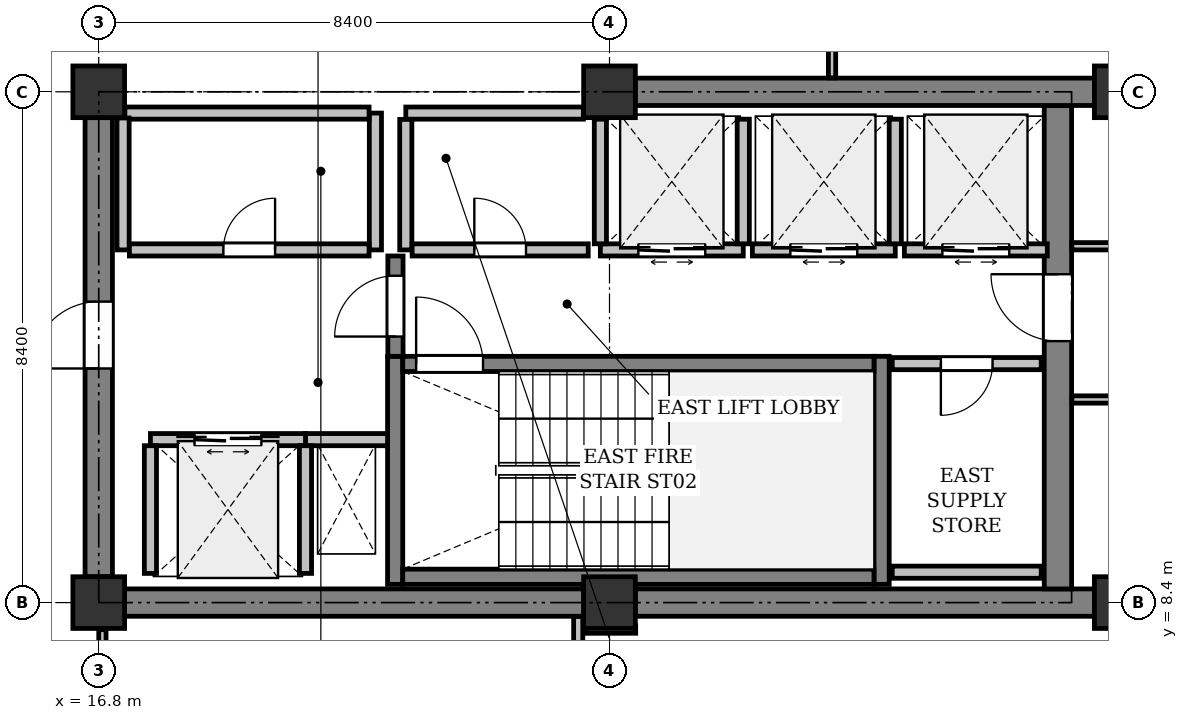
"""IFC4 building model, lengths in metres.
Left out: names, types, materials, properties, quantities, classifications, styles, units other than length and angle.
Written with IfcOpenShell. Run it as: python <this file> out.ifc"""

import sys

from ifc_helpers import new_model, si_unit, direction, frame, frame_2d, origin, origin_2d, place, context, subcontext, project, spatial, rectangle, extrude, element, fill, save


model = new_model("IFC4")
c1 = context("Model", 3, precision=1e-05, world=origin(), true_north=direction((0.0, 1.0)))
c2 = subcontext(c1, "Body", "Model", "MODEL_VIEW")
j1 = project(units=[si_unit("LENGTHUNIT", "METRE"), si_unit("PLANEANGLEUNIT", "RADIAN")], contexts=[c1])
p1 = place(None, origin())
s1 = spatial("IfcSite", under=j1, at=p1, CompositionType="ELEMENT")
p2 = place(p1, origin())
s2 = spatial("IfcBuilding", under=s1, at=p2, CompositionType="ELEMENT")
p3 = place(p2, frame((0.0, 0.0, 250.2)))
s3 = spatial("IfcBuildingStorey", under=s2, at=p3, CompositionType="ELEMENT", Elevation=250.2)
for number, where, z_axis, x_axis in (
    (1, (16.8, 8.4, 0.0), (0.0, 0.0, 1.0), (1.0, 0.0, 0.0)),
    (2, (16.8, 16.8, 0.0), (0.0, 0.0, 1.0), (1.0, 0.0, 0.0)),
    (3, (25.2, 8.4, 0.0), (0.0, 0.0, 1.0), (1.0, 0.0, 0.0)),
    (4, (25.2, 16.8, 0.0), (0.0, 0.0, 1.0), (1.0, 0.0, 0.0)),
    (5, (33.6, 8.4, 0.0), (0.0, 0.0, 1.0), (1.0, 0.0, 0.0)),
    (6, (33.6, 16.8, 0.0), (0.0, 0.0, 1.0), (1.0, 0.0, 0.0)),
):
    element("IfcColumn", number, at=place(p3, frame(where, z_axis=z_axis, x_axis=x_axis)), inside=s3, PredefinedType="COLUMN", context=c2, shape_type="SweptSolid", body=[
        extrude(rectangle(XDim=0.85, YDim=0.85, at=origin_2d()), origin(), (0.0, 0.0, 1.0), 4.0),
    ])
p4 = place(p3, frame((17.225, 8.4, 0.0), z_axis=(0.0, 0.0, 1.0), x_axis=(1.0, 0.0, 0.0)))
e7 = element("IfcWall", 7, at=p4, inside=s3, PredefinedType="SHEAR", context=c2, shape_type="SweptSolid", body=[
    extrude(rectangle(XDim=7.55, YDim=0.45, at=frame_2d((3.775, 0.0))), origin(), (0.0, 0.0, 1.0), 3.725),
])
p5 = place(p3, frame((25.625, 8.4, 0.0), z_axis=(0.0, 0.0, 1.0), x_axis=(1.0, 0.0, 0.0)))
e8 = element("IfcWall", 8, at=p5, inside=s3, PredefinedType="SHEAR", context=c2, shape_type="SweptSolid", body=[
    extrude(rectangle(XDim=7.55, YDim=0.45, at=frame_2d((3.775, 0.0))), origin(), (0.0, 0.0, 1.0), 3.725),
])
p6 = place(p3, frame((32.575, 8.625, 0.0), z_axis=(0.0, 0.0, 1.0), x_axis=(0.0, 1.0, 0.0)))
e9 = element("IfcWall", 9, at=p6, inside=s3, PredefinedType="SHEAR", context=c2, shape_type="SweptSolid", body=[
    extrude(rectangle(XDim=7.95, YDim=0.45, at=frame_2d((3.975, 0.0))), origin(), (0.0, 0.0, 1.0), 3.725),
])
p7 = place(p6, frame((4.075, 0.0, 0.0)))
e10 = element("IfcOpeningElement", 10, at=p7, cuts=e9, PredefinedType="OPENING", context=c2, shape_type="SweptSolid", body=[
    extrude(rectangle(XDim=1.1, YDim=2.15, at=frame_2d((0.55, 1.075))), frame((0.0, 0.235, 0.0), z_axis=(0.0, -1.0, 0.0), x_axis=(1.0, 0.0, 0.0)), (0.0, 0.0, 1.0), 0.47),
])
p8 = place(p3, frame((16.8, 8.825, 0.0), z_axis=(0.0, 0.0, 1.0), x_axis=(0.0, 1.0, 0.0)))
e11 = element("IfcWall", 11, at=p8, inside=s3, PredefinedType="SHEAR", context=c2, shape_type="SweptSolid", body=[
    extrude(rectangle(XDim=7.55, YDim=0.45, at=frame_2d((3.775, 0.0))), origin(), (0.0, 0.0, 1.0), 3.725),
])
p9 = place(p8, frame((3.425, 0.0, 0.0)))
e12 = element("IfcOpeningElement", 12, at=p9, cuts=e11, PredefinedType="OPENING", context=c2, shape_type="SweptSolid", body=[
    extrude(rectangle(XDim=1.1, YDim=2.15, at=frame_2d((0.55, 1.075))), frame((0.0, 0.235, 0.0), z_axis=(0.0, -1.0, 0.0), x_axis=(1.0, 0.0, 0.0)), (0.0, 0.0, 1.0), 0.47),
])
p10 = place(p3, frame((25.625, 16.8, 0.0), z_axis=(0.0, 0.0, 1.0), x_axis=(1.0, 0.0, 0.0)))
e13 = element("IfcWall", 13, at=p10, inside=s3, PredefinedType="SHEAR", context=c2, shape_type="SweptSolid", body=[
    extrude(rectangle(XDim=7.55, YDim=0.45, at=frame_2d((3.775, 0.0))), origin(), (0.0, 0.0, 1.0), 3.725),
])
for number, where, z_axis, x_axis in (
    (14, (21.675, 8.7, 0.0), (0.0, 0.0, 1.0), (0.0, 1.0, 0.0)),
    (15, (29.675, 8.7, 0.0), (0.0, 0.0, 1.0), (0.0, 1.0, 0.0)),
):
    element("IfcWall", number, at=place(p3, frame(where, z_axis=z_axis, x_axis=x_axis)), inside=s3, PredefinedType="SHEAR", context=c2, shape_type="SweptSolid", body=[
        extrude(rectangle(XDim=3.75, YDim=0.25, at=frame_2d((1.875, 0.0))), origin(), (0.0, 0.0, 1.0), 3.725),
    ])
p11 = place(p3, frame((21.8, 8.825, 0.0), z_axis=(0.0, 0.0, 1.0), x_axis=(1.0, 0.0, 0.0)))
e16 = element("IfcWall", 16, at=p11, inside=s3, PredefinedType="SHEAR", context=c2, shape_type="SweptSolid", body=[
    extrude(rectangle(XDim=7.75, YDim=0.25, at=frame_2d((3.875, 0.0))), origin(), (0.0, 0.0, 1.0), 3.725),
])
p12 = place(p3, frame((21.8, 12.325, 0.0), z_axis=(0.0, 0.0, 1.0), x_axis=(1.0, 0.0, 0.0)))
e17 = element("IfcWall", 17, at=p12, inside=s3, PredefinedType="SHEAR", context=c2, shape_type="SweptSolid", body=[
    extrude(rectangle(XDim=7.75, YDim=0.25, at=frame_2d((3.875, 0.0))), origin(), (0.0, 0.0, 1.0), 3.725),
])
p13 = place(p12, frame((0.22, 0.0, 0.0)))
e18 = element("IfcOpeningElement", 18, at=p13, cuts=e17, PredefinedType="OPENING", context=c2, shape_type="SweptSolid", body=[
    extrude(rectangle(XDim=1.1, YDim=2.15, at=frame_2d((0.55, 1.075))), frame((0.0, 0.135, 0.0), z_axis=(0.0, -1.0, 0.0), x_axis=(1.0, 0.0, 0.0)), (0.0, 0.0, 1.0), 0.27),
])
p14 = place(p3, frame((20.2, 11.08, 0.0), z_axis=(0.0, 0.0, 1.0), x_axis=(1.0, 0.0, 0.0)))
e19 = element("IfcWall", 19, at=p14, inside=s3, PredefinedType="PARTITIONING", context=c2, shape_type="SweptSolid", body=[
    extrude(rectangle(XDim=1.35, YDim=0.2, at=frame_2d((0.675, 0.0))), origin(), (0.0, 0.0, 1.0), 3.725),
])
p15 = place(p3, frame((21.68, 12.45, 0.0), z_axis=(0.0, 0.0, 1.0), x_axis=(0.0, 1.0, 0.0)))
e20 = element("IfcWall", 20, at=p15, inside=s3, PredefinedType="SHEAR", context=c2, shape_type="SweptSolid", body=[
    extrude(rectangle(XDim=1.65, YDim=0.25, at=frame_2d((0.825, 0.0))), origin(), (0.0, 0.0, 1.0), 3.725),
])
p16 = place(p15, frame((0.325, 0.0, 0.0)))
e21 = element("IfcOpeningElement", 21, at=p16, cuts=e20, PredefinedType="OPENING", context=c2, shape_type="SweptSolid", body=[
    extrude(rectangle(XDim=1.0, YDim=2.15, at=frame_2d((0.5, 1.075))), frame((0.0, 0.135, 0.0), z_axis=(0.0, -1.0, 0.0), x_axis=(1.0, 0.0, 0.0)), (0.0, 0.0, 1.0), 0.27),
])
p17 = place(p3, frame((17.65, 11.08, 0.0), z_axis=(0.0, 0.0, 1.0), x_axis=(1.0, 0.0, 0.0)))
e22 = element("IfcWall", 22, at=p17, inside=s3, PredefinedType="PARTITIONING", context=c2, shape_type="SweptSolid", body=[
    extrude(rectangle(XDim=2.55, YDim=0.2, at=frame_2d((1.275, 0.0))), origin(), (0.0, 0.0, 1.0), 3.725),
])
p18 = place(p17, frame((0.725, 0.0, 0.0)))
e23 = element("IfcOpeningElement", 23, at=p18, cuts=e22, PredefinedType="OPENING", context=c2, shape_type="SweptSolid", body=[
    extrude(rectangle(XDim=1.1, YDim=2.2, at=frame_2d((0.55, 1.1))), frame((0.0, 0.11, 0.0), z_axis=(0.0, -1.0, 0.0), x_axis=(1.0, 0.0, 0.0)), (0.0, 0.0, 1.0), 0.22),
])
for number, where, z_axis, x_axis in (
    (24, (20.2, 8.88, 0.0), (0.0, 0.0, 1.0), (0.0, 1.0, 0.0)),
    (25, (17.65, 8.88, 0.0), (0.0, 0.0, 1.0), (0.0, 1.0, 0.0)),
):
    element("IfcWall", number, at=place(p3, frame(where, z_axis=z_axis, x_axis=x_axis)), inside=s3, PredefinedType="PARTITIONING", context=c2, shape_type="SweptSolid", body=[
        extrude(rectangle(XDim=2.1, YDim=0.2, at=frame_2d((1.05, 0.0))), origin(), (0.0, 0.0, 1.0), 3.725),
    ])
p19 = place(p3, frame((25.05, 14.2, 0.0), z_axis=(0.0, 0.0, 1.0), x_axis=(1.0, 0.0, 0.0)))
e26 = element("IfcWall", 26, at=p19, inside=s3, PredefinedType="PARTITIONING", context=c2, shape_type="SweptSolid", body=[
    extrude(rectangle(XDim=2.35, YDim=0.2, at=frame_2d((1.175, 0.0))), origin(), (0.0, 0.0, 1.0), 3.725),
])
p20 = place(p19, frame((0.625, 0.0, 0.0)))
e27 = element("IfcOpeningElement", 27, at=p20, cuts=e26, PredefinedType="OPENING", context=c2, shape_type="SweptSolid", body=[
    extrude(rectangle(XDim=1.1, YDim=2.2, at=frame_2d((0.55, 1.1))), frame((0.0, 0.11, 0.0), z_axis=(0.0, -1.0, 0.0), x_axis=(1.0, 0.0, 0.0)), (0.0, 0.0, 1.0), 0.22),
])
for number, where, z_axis, x_axis in (
    (28, (27.4, 14.3, 0.0), (0.0, 0.0, 1.0), (0.0, 1.0, 0.0)),
    (29, (25.05, 14.3, 0.0), (0.0, 0.0, 1.0), (0.0, 1.0, 0.0)),
):
    element("IfcWall", number, at=place(p3, frame(where, z_axis=z_axis, x_axis=x_axis)), inside=s3, PredefinedType="PARTITIONING", context=c2, shape_type="SweptSolid", body=[
        extrude(rectangle(XDim=2.05, YDim=0.2, at=frame_2d((1.025, 0.0))), origin(), (0.0, 0.0, 1.0), 3.725),
    ])
p21 = place(p3, frame((27.55, 14.2, 0.0), z_axis=(0.0, 0.0, 1.0), x_axis=(1.0, 0.0, 0.0)))
e30 = element("IfcWall", 30, at=p21, inside=s3, PredefinedType="PARTITIONING", context=c2, shape_type="SweptSolid", body=[
    extrude(rectangle(XDim=2.35, YDim=0.2, at=frame_2d((1.175, 0.0))), origin(), (0.0, 0.0, 1.0), 3.725),
])
p22 = place(p21, frame((0.625, 0.0, 0.0)))
e31 = element("IfcOpeningElement", 31, at=p22, cuts=e30, PredefinedType="OPENING", context=c2, shape_type="SweptSolid", body=[
    extrude(rectangle(XDim=1.1, YDim=2.2, at=frame_2d((0.55, 1.1))), frame((0.0, 0.11, 0.0), z_axis=(0.0, -1.0, 0.0), x_axis=(1.0, 0.0, 0.0)), (0.0, 0.0, 1.0), 0.22),
])
p23 = place(p3, frame((29.9, 14.3, 0.0), z_axis=(0.0, 0.0, 1.0), x_axis=(0.0, 1.0, 0.0)))
e32 = element("IfcWall", 32, at=p23, inside=s3, PredefinedType="PARTITIONING", context=c2, shape_type="SweptSolid", body=[
    extrude(rectangle(XDim=2.05, YDim=0.2, at=frame_2d((1.025, 0.0))), origin(), (0.0, 0.0, 1.0), 3.725),
])
p24 = place(p3, frame((30.05, 14.2, 0.0), z_axis=(0.0, 0.0, 1.0), x_axis=(1.0, 0.0, 0.0)))
e33 = element("IfcWall", 33, at=p24, inside=s3, PredefinedType="PARTITIONING", context=c2, shape_type="SweptSolid", body=[
    extrude(rectangle(XDim=2.35, YDim=0.2, at=frame_2d((1.175, 0.0))), origin(), (0.0, 0.0, 1.0), 3.725),
])
p25 = place(p24, frame((0.625, 0.0, 0.0)))
e34 = element("IfcOpeningElement", 34, at=p25, cuts=e33, PredefinedType="OPENING", context=c2, shape_type="SweptSolid", body=[
    extrude(rectangle(XDim=1.1, YDim=2.2, at=frame_2d((0.55, 1.1))), frame((0.0, 0.11, 0.0), z_axis=(0.0, -1.0, 0.0), x_axis=(1.0, 0.0, 0.0)), (0.0, 0.0, 1.0), 0.22),
])
p26 = place(p3, frame((21.35, 14.2, 0.0), z_axis=(0.0, 0.0, 1.0), x_axis=(0.0, 1.0, 0.0)))
e35 = element("IfcWall", 35, at=p26, inside=s3, PredefinedType="PARTITIONING", context=c2, shape_type="SweptSolid", body=[
    extrude(rectangle(XDim=2.25, YDim=0.2, at=frame_2d((1.125, 0.0))), origin(), (0.0, 0.0, 1.0), 3.725),
])
p27 = place(p3, frame((21.246, 16.45, 0.0), z_axis=(0.0, 0.0, 1.0), x_axis=(-1.0, 0.0, 0.0)))
e36 = element("IfcWall", 36, at=p27, inside=s3, PredefinedType="PARTITIONING", context=c2, shape_type="SweptSolid", body=[
    extrude(rectangle(XDim=4.016, YDim=0.2, at=frame_2d((2.008, 0.0))), origin(), (0.0, 0.0, 1.0), 3.725),
])
p28 = place(p3, frame((17.2, 16.37, 0.0), z_axis=(0.0, 0.0, 1.0), x_axis=(0.0, -1.0, 0.0)))
e37 = element("IfcWall", 37, at=p28, inside=s3, PredefinedType="PARTITIONING", context=c2, shape_type="SweptSolid", body=[
    extrude(rectangle(XDim=2.17, YDim=0.2, at=frame_2d((1.085, 0.0))), origin(), (0.0, 0.0, 1.0), 3.725),
])
p29 = place(p3, frame((17.304, 14.2, 0.0), z_axis=(0.0, 0.0, 1.0), x_axis=(1.0, 0.0, 0.0)))
e38 = element("IfcWall", 38, at=p29, inside=s3, PredefinedType="PARTITIONING", context=c2, shape_type="SweptSolid", body=[
    extrude(rectangle(XDim=3.942, YDim=0.2, at=frame_2d((1.971, 0.0))), origin(), (0.0, 0.0, 1.0), 3.725),
])
p30 = place(p29, frame((1.546, 0.0, 0.0)))
e39 = element("IfcOpeningElement", 39, at=p30, cuts=e38, PredefinedType="OPENING", context=c2, shape_type="SweptSolid", body=[
    extrude(rectangle(XDim=0.85, YDim=2.15, at=frame_2d((0.425, 1.075))), frame((0.0, 0.11, 0.0), z_axis=(0.0, -1.0, 0.0), x_axis=(1.0, 0.0, 0.0)), (0.0, 0.0, 1.0), 0.22),
])
p31 = place(p3, frame((24.77, 16.45, 0.0), z_axis=(0.0, 0.0, 1.0), x_axis=(-1.0, 0.0, 0.0)))
e40 = element("IfcWall", 40, at=p31, inside=s3, PredefinedType="PARTITIONING", context=c2, shape_type="SweptSolid", body=[
    extrude(rectangle(XDim=2.92, YDim=0.2, at=frame_2d((1.46, 0.0))), origin(), (0.0, 0.0, 1.0), 3.725),
])
p32 = place(p3, frame((21.85, 16.346, 0.0), z_axis=(0.0, 0.0, 1.0), x_axis=(0.0, -1.0, 0.0)))
e41 = element("IfcWall", 41, at=p32, inside=s3, PredefinedType="PARTITIONING", context=c2, shape_type="SweptSolid", body=[
    extrude(rectangle(XDim=2.146, YDim=0.2, at=frame_2d((1.073, 0.0))), origin(), (0.0, 0.0, 1.0), 3.725),
])
p33 = place(p3, frame((21.954, 14.2, 0.0), z_axis=(0.0, 0.0, 1.0), x_axis=(1.0, 0.0, 0.0)))
e42 = element("IfcWall", 42, at=p33, inside=s3, PredefinedType="PARTITIONING", context=c2, shape_type="SweptSolid", body=[
    extrude(rectangle(XDim=2.896, YDim=0.2, at=frame_2d((1.448, 0.0))), origin(), (0.0, 0.0, 1.0), 3.725),
])
p34 = place(p33, frame((1.023, 0.0, 0.0)))
e43 = element("IfcOpeningElement", 43, at=p34, cuts=e42, PredefinedType="OPENING", context=c2, shape_type="SweptSolid", body=[
    extrude(rectangle(XDim=0.85, YDim=2.15, at=frame_2d((0.425, 1.075))), frame((0.0, 0.11, 0.0), z_axis=(0.0, -1.0, 0.0), x_axis=(1.0, 0.0, 0.0)), (0.0, 0.0, 1.0), 0.22),
])
p35 = place(p3, frame((32.3, 12.33, 0.0), z_axis=(0.0, 0.0, 1.0), x_axis=(-1.0, 0.0, 0.0)))
e44 = element("IfcWall", 44, at=p35, inside=s3, PredefinedType="PARTITIONING", context=c2, shape_type="SweptSolid", body=[
    extrude(rectangle(XDim=2.45, YDim=0.2, at=frame_2d((1.225, 0.0))), origin(), (0.0, 0.0, 1.0), 3.725),
])
p36 = place(p35, frame((0.8, 0.0, 0.0)))
e45 = element("IfcOpeningElement", 45, at=p36, cuts=e44, PredefinedType="OPENING", context=c2, shape_type="SweptSolid", body=[
    extrude(rectangle(XDim=0.85, YDim=2.15, at=frame_2d((0.425, 1.075))), frame((0.0, 0.11, 0.0), z_axis=(0.0, -1.0, 0.0), x_axis=(1.0, 0.0, 0.0)), (0.0, 0.0, 1.0), 0.22),
])
p37 = place(p3, frame((29.85, 8.9, 0.0), z_axis=(0.0, 0.0, 1.0), x_axis=(1.0, 0.0, 0.0)))
e46 = element("IfcWall", 46, at=p37, inside=s3, PredefinedType="PARTITIONING", context=c2, shape_type="SweptSolid", body=[
    extrude(rectangle(XDim=2.45, YDim=0.2, at=frame_2d((1.225, 0.0))), origin(), (0.0, 0.0, 1.0), 3.725),
])
p38 = place(p3, frame((28.86, 19.05, 0.0), z_axis=(0.0, 0.0, 1.0), x_axis=(0.0, -1.0, 0.0)))
e47 = element("IfcWall", 47, at=p38, inside=s3, PredefinedType="PARTITIONING", context=c2, shape_type="SweptSolid", body=[
    extrude(rectangle(XDim=2.021, YDim=0.12, at=frame_2d((1.01, 0.0))), origin(), (0.0, 0.0, 1.0), 3.725),
])
p39 = place(p3, frame((32.804, 14.26, 0.0), z_axis=(0.0, 0.0, 1.0), x_axis=(1.0, 0.0, 0.0)))
e48 = element("IfcWall", 48, at=p39, inside=s3, PredefinedType="PARTITIONING", context=c2, shape_type="SweptSolid", body=[
    extrude(rectangle(XDim=1.536, YDim=0.12, at=frame_2d((0.768, 0.0))), origin(), (0.0, 0.0, 1.0), 3.319),
])
p40 = place(p3, frame((24.686, 0.169, 0.0), z_axis=(0.0, 0.0, 1.0), x_axis=(0.0, 1.0, 0.0)))
e49 = element("IfcWall", 49, at=p40, inside=s3, PredefinedType="PARTITIONING", context=c2, shape_type="SweptSolid", body=[
    extrude(rectangle(XDim=8.002, YDim=0.15, at=frame_2d((4.001, 0.0))), origin(), (0.0, 0.0, 1.0), 3.725),
])
p41 = place(p3, frame((16.86, 7.955, 0.0), z_axis=(0.0, 0.0, 1.0), x_axis=(0.0, -1.0, 0.0)))
e50 = element("IfcWall", 50, at=p41, inside=s3, PredefinedType="PARTITIONING", context=c2, shape_type="SweptSolid", body=[
    extrude(rectangle(XDim=2.555, YDim=0.12, at=frame_2d((1.278, 0.0))), origin(), (0.0, 0.0, 1.0), 3.319),
])
p42 = place(p41, frame((0.802, 0.0, 0.0)))
e51 = element("IfcOpeningElement", 51, at=p42, cuts=e50, PredefinedType="OPENING", context=c2, shape_type="SweptSolid", body=[
    extrude(rectangle(XDim=0.95, YDim=2.15, at=frame_2d((0.475, 1.075))), frame((0.0, 0.07, 0.0), z_axis=(0.0, -1.0, 0.0), x_axis=(1.0, 0.0, 0.0)), (0.0, 0.0, 1.0), 0.14),
])
p43 = place(p3, frame((25.631, 7.956, 0.0), z_axis=(0.0, 0.0, 1.0), x_axis=(-0.999999606339, -0.000887311097, 0.0)))
e52 = element("IfcWall", 52, at=p43, inside=s3, PredefinedType="PARTITIONING", context=c2, shape_type="SweptSolid", body=[
    extrude(rectangle(XDim=0.825, YDim=0.12, at=frame_2d((0.413, 0.0))), origin(), (0.0, 0.0, 1.0), 3.319),
])
p44 = place(p3, frame((34.261, 11.74, 0.0), z_axis=(0.0, 0.0, 1.0), x_axis=(-1.0, 0.0, 0.0)))
e53 = element("IfcWall", 53, at=p44, inside=s3, PredefinedType="PARTITIONING", context=c2, shape_type="SweptSolid", body=[
    extrude(rectangle(XDim=1.457, YDim=0.12, at=frame_2d((0.729, 0.0))), origin(), (0.0, 0.0, 1.0), 3.319),
])
p45 = place(p7, origin())
e54 = element("IfcDoor", 54, at=p45, inside=s3, OperationType="SINGLE_SWING_RIGHT", PredefinedType="DOOR", context=c2, shape_type="SweptSolid", body=[
    extrude(rectangle(XDim=1.1, YDim=2.15, at=frame_2d((0.55, 1.075))), frame((0.0, 0.025, 0.0), z_axis=(0.0, -1.0, 0.0), x_axis=(1.0, 0.0, 0.0)), (0.0, 0.0, 1.0), 0.05),
])
fill(e10, e54)
p46 = place(p9, origin())
e55 = element("IfcDoor", 55, at=p46, inside=s3, OperationType="SINGLE_SWING_LEFT", PredefinedType="DOOR", context=c2, shape_type="SweptSolid", body=[
    extrude(rectangle(XDim=1.1, YDim=2.15, at=frame_2d((0.55, 1.075))), frame((0.0, 0.025, 0.0), z_axis=(0.0, -1.0, 0.0), x_axis=(1.0, 0.0, 0.0)), (0.0, 0.0, 1.0), 0.05),
])
fill(e12, e55)
p47 = place(p13, origin())
e56 = element("IfcDoor", 56, at=p47, inside=s3, OperationType="SINGLE_SWING_LEFT", PredefinedType="DOOR", context=c2, shape_type="SweptSolid", body=[
    extrude(rectangle(XDim=1.1, YDim=2.15, at=frame_2d((0.55, 1.075))), frame((0.0, 0.025, 0.0), z_axis=(0.0, -1.0, 0.0), x_axis=(1.0, 0.0, 0.0)), (0.0, 0.0, 1.0), 0.05),
])
fill(e18, e56)
p48 = place(p16, origin())
e57 = element("IfcDoor", 57, at=p48, inside=s3, OperationType="SINGLE_SWING_LEFT", PredefinedType="DOOR", context=c2, shape_type="SweptSolid", body=[
    extrude(rectangle(XDim=1.0, YDim=2.15, at=frame_2d((0.5, 1.075))), frame((0.0, 0.025, 0.0), z_axis=(0.0, -1.0, 0.0), x_axis=(1.0, 0.0, 0.0)), (0.0, 0.0, 1.0), 0.05),
])
fill(e21, e57)
p49 = place(p18, origin())
e58 = element("IfcDoor", 58, at=p49, inside=s3, OperationType="DOUBLE_DOOR_SLIDING", PredefinedType="DOOR", context=c2, shape_type="SweptSolid", body=[
    extrude(rectangle(XDim=1.1, YDim=2.2, at=frame_2d((0.55, 1.1))), frame((0.0, 0.025, 0.0), z_axis=(0.0, -1.0, 0.0), x_axis=(1.0, 0.0, 0.0)), (0.0, 0.0, 1.0), 0.05),
])
fill(e23, e58)
p50 = place(p20, origin())
e59 = element("IfcDoor", 59, at=p50, inside=s3, OperationType="DOUBLE_DOOR_SLIDING", PredefinedType="DOOR", context=c2, shape_type="SweptSolid", body=[
    extrude(rectangle(XDim=1.1, YDim=2.2, at=frame_2d((0.55, 1.1))), frame((0.0, 0.025, 0.0), z_axis=(0.0, -1.0, 0.0), x_axis=(1.0, 0.0, 0.0)), (0.0, 0.0, 1.0), 0.05),
])
fill(e27, e59)
p51 = place(p22, origin())
e60 = element("IfcDoor", 60, at=p51, inside=s3, OperationType="DOUBLE_DOOR_SLIDING", PredefinedType="DOOR", context=c2, shape_type="SweptSolid", body=[
    extrude(rectangle(XDim=1.1, YDim=2.2, at=frame_2d((0.55, 1.1))), frame((0.0, 0.025, 0.0), z_axis=(0.0, -1.0, 0.0), x_axis=(1.0, 0.0, 0.0)), (0.0, 0.0, 1.0), 0.05),
])
fill(e31, e60)
p52 = place(p25, origin())
e61 = element("IfcDoor", 61, at=p52, inside=s3, OperationType="DOUBLE_DOOR_SLIDING", PredefinedType="DOOR", context=c2, shape_type="SweptSolid", body=[
    extrude(rectangle(XDim=1.1, YDim=2.2, at=frame_2d((0.55, 1.1))), frame((0.0, 0.025, 0.0), z_axis=(0.0, -1.0, 0.0), x_axis=(1.0, 0.0, 0.0)), (0.0, 0.0, 1.0), 0.05),
])
fill(e34, e61)
p53 = place(p30, origin())
e62 = element("IfcDoor", 62, at=p53, inside=s3, OperationType="SINGLE_SWING_RIGHT", PredefinedType="DOOR", context=c2, shape_type="SweptSolid", body=[
    extrude(rectangle(XDim=0.85, YDim=2.15, at=frame_2d((0.425, 1.075))), frame((0.0, 0.025, 0.0), z_axis=(0.0, -1.0, 0.0), x_axis=(1.0, 0.0, 0.0)), (0.0, 0.0, 1.0), 0.05),
])
fill(e39, e62)
p54 = place(p34, origin())
e63 = element("IfcDoor", 63, at=p54, inside=s3, OperationType="SINGLE_SWING_LEFT", PredefinedType="DOOR", context=c2, shape_type="SweptSolid", body=[
    extrude(rectangle(XDim=0.85, YDim=2.15, at=frame_2d((0.425, 1.075))), frame((0.0, 0.025, 0.0), z_axis=(0.0, -1.0, 0.0), x_axis=(1.0, 0.0, 0.0)), (0.0, 0.0, 1.0), 0.05),
])
fill(e43, e63)
p55 = place(p36, origin())
e64 = element("IfcDoor", 64, at=p55, inside=s3, OperationType="SINGLE_SWING_RIGHT", PredefinedType="DOOR", context=c2, shape_type="SweptSolid", body=[
    extrude(rectangle(XDim=0.85, YDim=2.15, at=frame_2d((0.425, 1.075))), frame((0.0, 0.025, 0.0), z_axis=(0.0, -1.0, 0.0), x_axis=(1.0, 0.0, 0.0)), (0.0, 0.0, 1.0), 0.05),
])
fill(e45, e64)
save(model, sys.argv[1])
